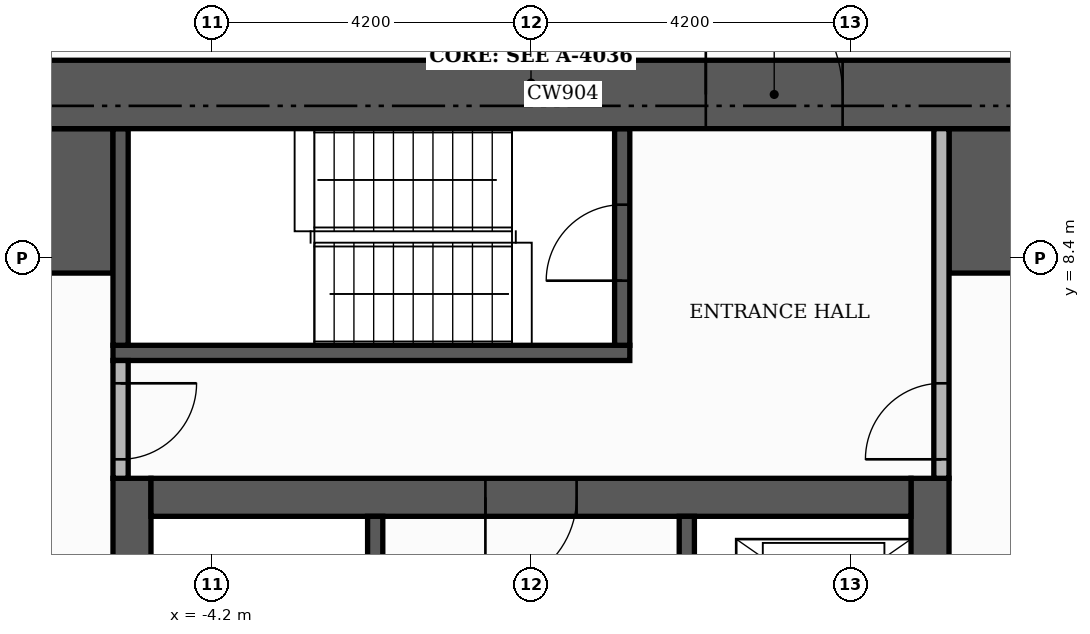
"""IFC4 building model, lengths in metres.
Left out: names, types, materials, properties, quantities, classifications, styles, units other than length and angle.
Written with IfcOpenShell. Run it as: python <this file> out.ifc"""

import sys

from ifc_helpers import new_model, si_unit, direction, frame, frame_2d, origin, place, context, subcontext, project, spatial, rectangle, extrude, element, fill, save


model = new_model("IFC4")
c1 = context("Model", 3, precision=1e-05, world=origin(), true_north=direction((0.0, 1.0)))
c2 = subcontext(c1, "Body", "Model", "MODEL_VIEW")
j1 = project(units=[si_unit("LENGTHUNIT", "METRE"), si_unit("PLANEANGLEUNIT", "RADIAN")], contexts=[c1])
p1 = place(None, origin())
s1 = spatial("IfcSite", under=j1, at=p1, CompositionType="ELEMENT")
p2 = place(p1, origin())
s2 = spatial("IfcBuilding", under=s1, at=p2, CompositionType="ELEMENT")
p3 = place(p2, frame((0.0, 0.0, 211.8)))
s3 = spatial("IfcBuildingStorey", under=s2, at=p3, CompositionType="ELEMENT", Elevation=211.8)
for number, where, z_axis, x_axis in (
    (1, (-5.25, -5.0, 0.0), (0.0, 0.0, 1.0), (0.0, 1.0, 0.0)),
    (2, (5.25, -5.0, 0.0), (0.0, 0.0, 1.0), (0.0, 1.0, 0.0)),
):
    element("IfcWall", number, at=place(p3, frame(where, z_axis=z_axis, x_axis=x_axis)), inside=s3, PredefinedType="SHEAR", context=c2, shape_type="SweptSolid", body=[
        extrude(rectangle(XDim=10.5, YDim=0.5, at=frame_2d((5.25, 0.0))), origin(), (0.0, 0.0, 1.0), 3.48),
    ])
p4 = place(p3, frame((-5.0, 5.25, 0.0), z_axis=(0.0, 0.0, 1.0), x_axis=(1.0, 0.0, 0.0)))
e3 = element("IfcWall", 3, at=p4, inside=s3, PredefinedType="SHEAR", context=c2, shape_type="SweptSolid", body=[
    extrude(rectangle(XDim=10.0, YDim=0.5, at=frame_2d((5.0, 0.0))), origin(), (0.0, 0.0, 1.0), 3.48),
])
p5 = place(p4, frame((4.4, 0.0, 0.0)))
e4 = element("IfcOpeningElement", 4, at=p5, cuts=e3, PredefinedType="OPENING", context=c2, shape_type="SweptSolid", body=[
    extrude(rectangle(XDim=1.2, YDim=2.1, at=frame_2d((0.6, 1.05))), frame((0.0, 0.26, 0.0), z_axis=(0.0, -1.0, 0.0), x_axis=(1.0, 0.0, 0.0)), (0.0, 0.0, 1.0), 0.52),
])
for number, where, z_axis, x_axis in (
    (5, (-10.1, 9.15, 0.0), (0.0, 0.0, 1.0), (1.0, 0.0, 0.0)),
    (6, (5.5, 9.15, 0.0), (0.0, 0.0, 1.0), (1.0, 0.0, 0.0)),
):
    element("IfcWall", number, at=place(p3, frame(where, z_axis=z_axis, x_axis=x_axis)), inside=s3, PredefinedType="SHEAR", context=c2, shape_type="SweptSolid", body=[
        extrude(rectangle(XDim=4.6, YDim=1.9, at=frame_2d((2.3, 0.0))), origin(), (0.0, 0.0, 1.0), 3.48),
    ])
p6 = place(p3, frame((-2.05, -1.4, 0.0), z_axis=(0.0, 0.0, 1.0), x_axis=(0.0, 1.0, 0.0)))
e7 = element("IfcWall", 7, at=p6, inside=s3, PredefinedType="SHEAR", context=c2, shape_type="SweptSolid", body=[
    extrude(rectangle(XDim=6.4, YDim=0.2, at=frame_2d((3.2, 0.0))), origin(), (0.0, 0.0, 1.0), 3.48),
])
p7 = place(p6, frame((0.15, 0.0, 0.0)))
e8 = element("IfcOpeningElement", 8, at=p7, cuts=e7, PredefinedType="OPENING", context=c2, shape_type="SweptSolid", body=[
    extrude(rectangle(XDim=1.0, YDim=2.1, at=frame_2d((0.5, 1.05))), frame((0.0, 0.11, 0.0), z_axis=(0.0, -1.0, 0.0), x_axis=(1.0, 0.0, 0.0)), (0.0, 0.0, 1.0), 0.22),
])
p8 = place(p3, frame((-5.5, 7.15, 0.0), z_axis=(0.0, 0.0, 1.0), x_axis=(1.0, 0.0, 0.0)))
e9 = element("IfcWall", 9, at=p8, inside=s3, PredefinedType="SHEAR", context=c2, shape_type="SweptSolid", body=[
    extrude(rectangle(XDim=6.8, YDim=0.2, at=frame_2d((3.4, 0.0))), origin(), (0.0, 0.0, 1.0), 3.48),
])
p9 = place(p3, frame((-5.4, 7.25, 0.0), z_axis=(0.0, 0.0, 1.0), x_axis=(0.0, 1.0, 0.0)))
e10 = element("IfcWall", 10, at=p9, inside=s3, PredefinedType="SHEAR", context=c2, shape_type="SweptSolid", body=[
    extrude(rectangle(XDim=2.85, YDim=0.2, at=frame_2d((1.425, 0.0))), origin(), (0.0, 0.0, 1.0), 3.48),
])
p10 = place(p3, frame((1.2, 7.25, 0.0), z_axis=(0.0, 0.0, 1.0), x_axis=(0.0, 1.0, 0.0)))
e11 = element("IfcWall", 11, at=p10, inside=s3, PredefinedType="SHEAR", context=c2, shape_type="SweptSolid", body=[
    extrude(rectangle(XDim=2.85, YDim=0.2, at=frame_2d((1.425, 0.0))), origin(), (0.0, 0.0, 1.0), 3.48),
])
p11 = place(p10, frame((0.85, 0.0, 0.0)))
e12 = element("IfcOpeningElement", 12, at=p11, cuts=e11, PredefinedType="OPENING", context=c2, shape_type="SweptSolid", body=[
    extrude(rectangle(XDim=1.0, YDim=2.1, at=frame_2d((0.5, 1.05))), frame((0.0, 0.11, 0.0), z_axis=(0.0, -1.0, 0.0), x_axis=(1.0, 0.0, 0.0)), (0.0, 0.0, 1.0), 0.22),
])
p12 = place(p3, frame((2.05, 1.6, 0.0), z_axis=(0.0, 0.0, 1.0), x_axis=(0.0, 1.0, 0.0)))
e13 = element("IfcWall", 13, at=p12, inside=s3, PredefinedType="SHEAR", context=c2, shape_type="SweptSolid", body=[
    extrude(rectangle(XDim=3.4, YDim=0.2, at=frame_2d((1.7, 0.0))), origin(), (0.0, 0.0, 1.0), 3.48),
])
p13 = place(p12, frame((1.75, 0.0, 0.0)))
e14 = element("IfcOpeningElement", 14, at=p13, cuts=e13, PredefinedType="OPENING", context=c2, shape_type="SweptSolid", body=[
    extrude(rectangle(XDim=1.1, YDim=2.1, at=frame_2d((0.55, 1.05))), frame((0.0, 0.11, 0.0), z_axis=(0.0, -1.0, 0.0), x_axis=(1.0, 0.0, 0.0)), (0.0, 0.0, 1.0), 0.22),
])
p14 = place(p12, frame((0.15, 0.0, 0.0)))
e15 = element("IfcOpeningElement", 15, at=p14, cuts=e13, PredefinedType="OPENING", context=c2, shape_type="SweptSolid", body=[
    extrude(rectangle(XDim=0.8, YDim=2.1, at=frame_2d((0.4, 1.05))), frame((0.0, 0.11, 0.0), z_axis=(0.0, -1.0, 0.0), x_axis=(1.0, 0.0, 0.0)), (0.0, 0.0, 1.0), 0.22),
])
p15 = place(p3, frame((-11.0, 10.55, 0.0), z_axis=(0.0, 0.0, 1.0), x_axis=(1.0, 0.0, 0.0)))
e16 = element("IfcWall", 16, at=p15, inside=s3, PredefinedType="SHEAR", context=c2, shape_type="SweptSolid", body=[
    extrude(rectangle(XDim=22.0, YDim=0.9, at=frame_2d((11.0, 0.0))), origin(), (0.0, 0.0, 1.0), 3.48),
])
p16 = place(p15, frame((13.3, 0.0, 0.0)))
e17 = element("IfcOpeningElement", 17, at=p16, cuts=e16, PredefinedType="OPENING", context=c2, shape_type="SweptSolid", body=[
    extrude(rectangle(XDim=1.8, YDim=2.2, at=frame_2d((0.9, 1.1))), frame((0.0, 0.46, 0.0), z_axis=(0.0, -1.0, 0.0), x_axis=(1.0, 0.0, 0.0)), (0.0, 0.0, 1.0), 0.92),
])
p17 = place(p3, frame((-5.4, 5.5, 0.0), z_axis=(0.0, 0.0, 1.0), x_axis=(0.0, 1.0, 0.0)))
e18 = element("IfcWall", 18, at=p17, inside=s3, PredefinedType="PARTITIONING", context=c2, shape_type="SweptSolid", body=[
    extrude(rectangle(XDim=1.55, YDim=0.2, at=frame_2d((0.775, 0.0))), origin(), (0.0, 0.0, 1.0), 3.48),
])
p18 = place(p17, frame((0.25, 0.0, 0.0)))
e19 = element("IfcOpeningElement", 19, at=p18, cuts=e18, PredefinedType="OPENING", context=c2, shape_type="SweptSolid", body=[
    extrude(rectangle(XDim=1.0, YDim=2.1, at=frame_2d((0.5, 1.05))), frame((0.0, 0.11, 0.0), z_axis=(0.0, -1.0, 0.0), x_axis=(1.0, 0.0, 0.0)), (0.0, 0.0, 1.0), 0.22),
])
p19 = place(p3, frame((5.4, 5.5, 0.0), z_axis=(0.0, 0.0, 1.0), x_axis=(0.0, 1.0, 0.0)))
e20 = element("IfcWall", 20, at=p19, inside=s3, PredefinedType="PARTITIONING", context=c2, shape_type="SweptSolid", body=[
    extrude(rectangle(XDim=4.6, YDim=0.2, at=frame_2d((2.3, 0.0))), origin(), (0.0, 0.0, 1.0), 3.48),
])
p20 = place(p19, frame((0.25, 0.0, 0.0)))
e21 = element("IfcOpeningElement", 21, at=p20, cuts=e20, PredefinedType="OPENING", context=c2, shape_type="SweptSolid", body=[
    extrude(rectangle(XDim=1.0, YDim=2.1, at=frame_2d((0.5, 1.05))), frame((0.0, 0.11, 0.0), z_axis=(0.0, -1.0, 0.0), x_axis=(1.0, 0.0, 0.0)), (0.0, 0.0, 1.0), 0.22),
])
p21 = place(p5, frame((1.2, 0.0, 0.0), z_axis=(0.0, 0.0, 1.0), x_axis=(-1.0, 0.0, 0.0)))
e22 = element("IfcDoor", 22, at=p21, inside=s3, OperationType="SINGLE_SWING_LEFT", PredefinedType="DOOR", context=c2, shape_type="SweptSolid", body=[
    extrude(rectangle(XDim=1.2, YDim=2.1, at=frame_2d((0.6, 1.05))), frame((0.0, 0.025, 0.0), z_axis=(0.0, -1.0, 0.0), x_axis=(1.0, 0.0, 0.0)), (0.0, 0.0, 1.0), 0.05),
])
fill(e4, e22)
p22 = place(p11, origin())
e23 = element("IfcDoor", 23, at=p22, inside=s3, OperationType="SINGLE_SWING_LEFT", PredefinedType="DOOR", context=c2, shape_type="SweptSolid", body=[
    extrude(rectangle(XDim=1.0, YDim=2.1, at=frame_2d((0.5, 1.05))), frame((0.0, 0.025, 0.0), z_axis=(0.0, -1.0, 0.0), x_axis=(1.0, 0.0, 0.0)), (0.0, 0.0, 1.0), 0.05),
])
fill(e12, e23)
p23 = place(p18, frame((1.0, 0.0, 0.0), z_axis=(0.0, 0.0, 1.0), x_axis=(-1.0, 0.0, 0.0)))
e24 = element("IfcDoor", 24, at=p23, inside=s3, OperationType="SINGLE_SWING_RIGHT", PredefinedType="DOOR", context=c2, shape_type="SweptSolid", body=[
    extrude(rectangle(XDim=1.0, YDim=2.1, at=frame_2d((0.5, 1.05))), frame((0.0, 0.025, 0.0), z_axis=(0.0, -1.0, 0.0), x_axis=(1.0, 0.0, 0.0)), (0.0, 0.0, 1.0), 0.05),
])
fill(e19, e24)
p24 = place(p20, origin())
e25 = element("IfcDoor", 25, at=p24, inside=s3, OperationType="SINGLE_SWING_LEFT", PredefinedType="DOOR", context=c2, shape_type="SweptSolid", body=[
    extrude(rectangle(XDim=1.0, YDim=2.1, at=frame_2d((0.5, 1.05))), frame((0.0, 0.025, 0.0), z_axis=(0.0, -1.0, 0.0), x_axis=(1.0, 0.0, 0.0)), (0.0, 0.0, 1.0), 0.05),
])
fill(e21, e25)
p25 = place(p16, origin())
e26 = element("IfcDoor", 26, at=p25, inside=s3, OperationType="DOUBLE_DOOR_SINGLE_SWING", PredefinedType="DOOR", context=c2, shape_type="SweptSolid", body=[
    extrude(rectangle(XDim=1.8, YDim=2.2, at=frame_2d((0.9, 1.1))), frame((0.0, 0.025, 0.0), z_axis=(0.0, -1.0, 0.0), x_axis=(1.0, 0.0, 0.0)), (0.0, 0.0, 1.0), 0.05),
])
fill(e17, e26)
save(model, sys.argv[1])
